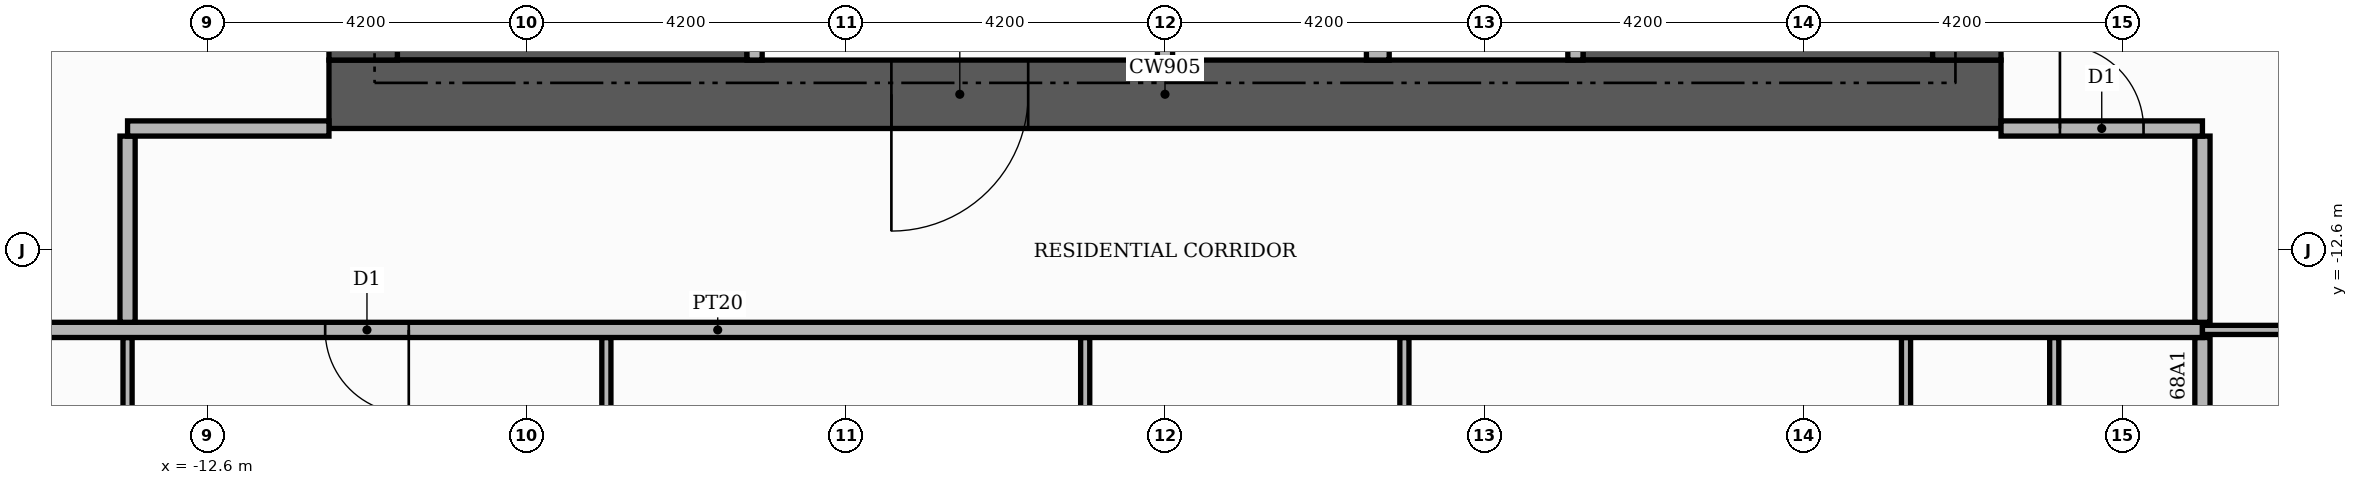
"""IFC4 building model, lengths in metres.
Left out: names, types, materials, properties, quantities, classifications, styles, units other than length and angle.
Written with IfcOpenShell. Run it as: python <this file> out.ifc"""

import sys

from ifc_helpers import new_model, si_unit, direction, frame, frame_2d, origin, place, context, subcontext, project, spatial, rectangle, extrude, element, fill, save


model = new_model("IFC4")
c1 = context("Model", 3, precision=1e-05, world=origin(), true_north=direction((0.0, 1.0)))
c2 = subcontext(c1, "Body", "Model", "MODEL_VIEW")
j1 = project(units=[si_unit("LENGTHUNIT", "METRE"), si_unit("PLANEANGLEUNIT", "RADIAN")], contexts=[c1])
p1 = place(None, origin())
s1 = spatial("IfcSite", under=j1, at=p1, CompositionType="ELEMENT")
p2 = place(p1, origin())
s2 = spatial("IfcBuilding", under=s1, at=p2, CompositionType="ELEMENT")
p3 = place(p2, frame((0.0, 0.0, 283.5)))
s3 = spatial("IfcBuildingStorey", under=s2, at=p3, CompositionType="ELEMENT", Elevation=283.5)
for number, where, z_axis, x_axis in (
    (1, (-10.1, -9.15, 0.0), (0.0, 0.0, 1.0), (1.0, 0.0, 0.0)),
    (2, (5.5, -9.15, 0.0), (0.0, 0.0, 1.0), (1.0, 0.0, 0.0)),
):
    element("IfcWall", number, at=place(p3, frame(where, z_axis=z_axis, x_axis=x_axis)), inside=s3, PredefinedType="SHEAR", context=c2, shape_type="SweptSolid", body=[
        extrude(rectangle(XDim=4.6, YDim=1.9, at=frame_2d((2.3, 0.0))), origin(), (0.0, 0.0, 1.0), 3.4),
    ])
p4 = place(p3, frame((-11.0, -10.55, 0.0), z_axis=(0.0, 0.0, 1.0), x_axis=(1.0, 0.0, 0.0)))
e3 = element("IfcWall", 3, at=p4, inside=s3, PredefinedType="SHEAR", context=c2, shape_type="SweptSolid", body=[
    extrude(rectangle(XDim=22.0, YDim=0.9, at=frame_2d((11.0, 0.0))), origin(), (0.0, 0.0, 1.0), 3.4),
])
p5 = place(p4, frame((7.4, 0.0, 0.0)))
e4 = element("IfcOpeningElement", 4, at=p5, cuts=e3, PredefinedType="OPENING", context=c2, shape_type="SweptSolid", body=[
    extrude(rectangle(XDim=1.8, YDim=2.2, at=frame_2d((0.9, 1.1))), frame((0.0, 0.46, 0.0), z_axis=(0.0, -1.0, 0.0), x_axis=(1.0, 0.0, 0.0)), (0.0, 0.0, 1.0), 0.92),
])
for number, where, z_axis, x_axis in (
    (5, (-10.55, -10.1, 0.0), (0.0, 0.0, 1.0), (0.0, 1.0, 0.0)),
    (6, (10.55, -10.1, 0.0), (0.0, 0.0, 1.0), (0.0, 1.0, 0.0)),
):
    element("IfcWall", number, at=place(p3, frame(where, z_axis=z_axis, x_axis=x_axis)), inside=s3, PredefinedType="SHEAR", context=c2, shape_type="SweptSolid", body=[
        extrude(rectangle(XDim=20.2, YDim=0.9, at=frame_2d((10.1, 0.0))), origin(), (0.0, 0.0, 1.0), 3.4),
    ])
p6 = place(p3, frame((-5.4, -10.1, 0.0), z_axis=(0.0, 0.0, 1.0), x_axis=(0.0, 1.0, 0.0)))
e7 = element("IfcWall", 7, at=p6, inside=s3, PredefinedType="PARTITIONING", context=c2, shape_type="SweptSolid", body=[
    extrude(rectangle(XDim=4.6, YDim=0.2, at=frame_2d((2.3, 0.0))), origin(), (0.0, 0.0, 1.0), 3.4),
])
p7 = place(p6, frame((2.9, 0.0, 0.0)))
e8 = element("IfcOpeningElement", 8, at=p7, cuts=e7, PredefinedType="OPENING", context=c2, shape_type="SweptSolid", body=[
    extrude(rectangle(XDim=1.0, YDim=2.1, at=frame_2d((0.5, 1.05))), frame((0.0, 0.11, 0.0), z_axis=(0.0, -1.0, 0.0), x_axis=(1.0, 0.0, 0.0)), (0.0, 0.0, 1.0), 0.22),
])
p8 = place(p3, frame((0.0, -10.1, 0.0), z_axis=(0.0, 0.0, 1.0), x_axis=(0.0, 1.0, 0.0)))
e9 = element("IfcWall", 9, at=p8, inside=s3, PredefinedType="PARTITIONING", context=c2, shape_type="SweptSolid", body=[
    extrude(rectangle(XDim=2.2, YDim=0.2, at=frame_2d((1.1, 0.0))), origin(), (0.0, 0.0, 1.0), 3.4),
])
p9 = place(p3, frame((2.8, -10.1, 0.0), z_axis=(0.0, 0.0, 1.0), x_axis=(0.0, 1.0, 0.0)))
e10 = element("IfcWall", 10, at=p9, inside=s3, PredefinedType="PARTITIONING", context=c2, shape_type="SweptSolid", body=[
    extrude(rectangle(XDim=2.2, YDim=0.3, at=frame_2d((1.1, 0.0))), origin(), (0.0, 0.0, 1.0), 3.4),
])
p10 = place(p3, frame((5.4, -10.1, 0.0), z_axis=(0.0, 0.0, 1.0), x_axis=(0.0, 1.0, 0.0)))
e11 = element("IfcWall", 11, at=p10, inside=s3, PredefinedType="PARTITIONING", context=c2, shape_type="SweptSolid", body=[
    extrude(rectangle(XDim=4.6, YDim=0.2, at=frame_2d((2.3, 0.0))), origin(), (0.0, 0.0, 1.0), 3.4),
])
p11 = place(p10, frame((2.9, 0.0, 0.0)))
e12 = element("IfcOpeningElement", 12, at=p11, cuts=e11, PredefinedType="OPENING", context=c2, shape_type="SweptSolid", body=[
    extrude(rectangle(XDim=1.0, YDim=2.1, at=frame_2d((0.5, 1.05))), frame((0.0, 0.11, 0.0), z_axis=(0.0, -1.0, 0.0), x_axis=(1.0, 0.0, 0.0)), (0.0, 0.0, 1.0), 0.22),
])
p12 = place(p3, frame((13.65, -20.42, 0.0), z_axis=(0.0, 0.0, 1.0), x_axis=(0.0, 1.0, 0.0)))
e13 = element("IfcWall", 13, at=p12, inside=s3, PredefinedType="PARTITIONING", context=c2, shape_type="SweptSolid", body=[
    extrude(rectangle(XDim=6.67, YDim=0.2, at=frame_2d((3.335, 0.0))), origin(), (0.0, 0.0, 1.0), 3.4),
])
p13 = place(p3, frame((-13.65, -20.119, 0.0), z_axis=(0.0, 0.0, 1.0), x_axis=(0.0, 1.0, 0.0)))
e14 = element("IfcWall", 14, at=p13, inside=s3, PredefinedType="PARTITIONING", context=c2, shape_type="SweptSolid", body=[
    extrude(rectangle(XDim=6.369, YDim=0.12, at=frame_2d((3.185, 0.0))), origin(), (0.0, 0.0, 1.0), 3.4),
])
p14 = place(p13, frame((2.784, 0.0, 0.0)))
e15 = element("IfcOpeningElement", 15, at=p14, cuts=e14, PredefinedType="OPENING", context=c2, shape_type="SweptSolid", body=[
    extrude(rectangle(XDim=0.9, YDim=2.1, at=frame_2d((0.45, 1.05))), frame((0.0, 0.07, 0.0), z_axis=(0.0, -1.0, 0.0), x_axis=(1.0, 0.0, 0.0)), (0.0, 0.0, 1.0), 0.14),
])
for number, where, z_axis, x_axis in (
    (16, (-7.35, -18.56, 0.0), (0.0, 0.0, 1.0), (0.0, 1.0, 0.0)),
    (17, (-1.05, -18.56, 0.0), (0.0, 0.0, 1.0), (0.0, 1.0, 0.0)),
    (18, (3.15, -18.56, 0.0), (0.0, 0.0, 1.0), (0.0, 1.0, 0.0)),
    (19, (9.75, -18.56, 0.0), (0.0, 0.0, 1.0), (0.0, 1.0, 0.0)),
    (20, (11.7, -18.56, 0.0), (0.0, 0.0, 1.0), (0.0, 1.0, 0.0)),
):
    element("IfcWall", number, at=place(p3, frame(where, z_axis=z_axis, x_axis=x_axis)), inside=s3, PredefinedType="PARTITIONING", context=c2, shape_type="SweptSolid", body=[
        extrude(rectangle(XDim=4.81, YDim=0.12, at=frame_2d((2.405, 0.0))), origin(), (0.0, 0.0, 1.0), 3.4),
    ])
p15 = place(p3, frame((-25.42, -13.65, 0.0), z_axis=(0.0, 0.0, 1.0), x_axis=(1.0, 0.0, 0.0)))
e21 = element("IfcWall", 21, at=p15, inside=s3, PredefinedType="PARTITIONING", context=c2, shape_type="SweptSolid", body=[
    extrude(rectangle(XDim=39.07, YDim=0.2, at=frame_2d((19.535, 0.0))), origin(), (0.0, 0.0, 1.0), 3.4),
])
p16 = place(p15, frame((14.37, 0.0, 0.0)))
e22 = element("IfcOpeningElement", 22, at=p16, cuts=e21, PredefinedType="OPENING", context=c2, shape_type="SweptSolid", body=[
    extrude(rectangle(XDim=1.1, YDim=2.4, at=frame_2d((0.55, 1.2))), frame((0.0, 0.11, 0.0), z_axis=(0.0, -1.0, 0.0), x_axis=(1.0, 0.0, 0.0)), (0.0, 0.0, 1.0), 0.22),
])
p17 = place(p3, frame((13.65, -13.65, 0.0), z_axis=(0.0, 0.0, 1.0), x_axis=(1.0, 0.0, 0.0)))
e23 = element("IfcWall", 23, at=p17, inside=s3, PredefinedType="PARTITIONING", context=c2, shape_type="SweptSolid", body=[
    extrude(rectangle(XDim=6.77, YDim=0.12, at=frame_2d((3.385, 0.0))), origin(), (0.0, 0.0, 1.0), 3.4),
])
p18 = place(p17, frame((2.885, 0.0, 0.0)))
e24 = element("IfcOpeningElement", 24, at=p18, cuts=e23, PredefinedType="OPENING", context=c2, shape_type="SweptSolid", body=[
    extrude(rectangle(XDim=1.0, YDim=2.1, at=frame_2d((0.5, 1.05))), frame((0.0, 0.07, 0.0), z_axis=(0.0, -1.0, 0.0), x_axis=(1.0, 0.0, 0.0)), (0.0, 0.0, 1.0), 0.14),
])
for number, where, z_axis, x_axis in (
    (25, (-13.65, -13.55, 0.0), (0.0, 0.0, 1.0), (0.0, 1.0, 0.0)),
    (26, (13.65, -13.55, 0.0), (0.0, 0.0, 1.0), (0.0, 1.0, 0.0)),
):
    element("IfcWall", number, at=place(p3, frame(where, z_axis=z_axis, x_axis=x_axis)), inside=s3, PredefinedType="PARTITIONING", context=c2, shape_type="SweptSolid", body=[
        extrude(rectangle(XDim=2.45, YDim=0.2, at=frame_2d((1.225, 0.0))), origin(), (0.0, 0.0, 1.0), 3.4),
    ])
p19 = place(p3, frame((-13.65, -11.0, 0.0), z_axis=(0.0, 0.0, 1.0), x_axis=(1.0, 0.0, 0.0)))
e27 = element("IfcWall", 27, at=p19, inside=s3, PredefinedType="PARTITIONING", context=c2, shape_type="SweptSolid", body=[
    extrude(rectangle(XDim=2.65, YDim=0.2, at=frame_2d((1.325, 0.0))), origin(), (0.0, 0.0, 1.0), 3.4),
])
p20 = place(p3, frame((11.0, -11.0, 0.0), z_axis=(0.0, 0.0, 1.0), x_axis=(1.0, 0.0, 0.0)))
e28 = element("IfcWall", 28, at=p20, inside=s3, PredefinedType="PARTITIONING", context=c2, shape_type="SweptSolid", body=[
    extrude(rectangle(XDim=2.65, YDim=0.2, at=frame_2d((1.325, 0.0))), origin(), (0.0, 0.0, 1.0), 3.4),
])
p21 = place(p20, frame((0.775, 0.0, 0.0)))
e29 = element("IfcOpeningElement", 29, at=p21, cuts=e28, PredefinedType="OPENING", context=c2, shape_type="SweptSolid", body=[
    extrude(rectangle(XDim=1.1, YDim=2.4, at=frame_2d((0.55, 1.2))), frame((0.0, 0.11, 0.0), z_axis=(0.0, -1.0, 0.0), x_axis=(1.0, 0.0, 0.0)), (0.0, 0.0, 1.0), 0.22),
])
p22 = place(p5, frame((1.8, 0.0, 0.0), z_axis=(0.0, 0.0, 1.0), x_axis=(-1.0, 0.0, 0.0)))
e30 = element("IfcDoor", 30, at=p22, inside=s3, OperationType="DOUBLE_DOOR_SINGLE_SWING", PredefinedType="DOOR", context=c2, shape_type="SweptSolid", body=[
    extrude(rectangle(XDim=1.8, YDim=2.2, at=frame_2d((0.9, 1.1))), frame((0.0, 0.025, 0.0), z_axis=(0.0, -1.0, 0.0), x_axis=(1.0, 0.0, 0.0)), (0.0, 0.0, 1.0), 0.05),
])
fill(e4, e30)
p23 = place(p16, frame((1.1, 0.0, 0.0), z_axis=(0.0, 0.0, 1.0), x_axis=(-1.0, 0.0, 0.0)))
e31 = element("IfcDoor", 31, at=p23, inside=s3, OperationType="SINGLE_SWING_RIGHT", PredefinedType="DOOR", context=c2, shape_type="SweptSolid", body=[
    extrude(rectangle(XDim=1.1, YDim=2.4, at=frame_2d((0.55, 1.2))), frame((0.0, 0.025, 0.0), z_axis=(0.0, -1.0, 0.0), x_axis=(1.0, 0.0, 0.0)), (0.0, 0.0, 1.0), 0.05),
])
fill(e22, e31)
p24 = place(p21, origin())
e32 = element("IfcDoor", 32, at=p24, inside=s3, OperationType="SINGLE_SWING_LEFT", PredefinedType="DOOR", context=c2, shape_type="SweptSolid", body=[
    extrude(rectangle(XDim=1.1, YDim=2.4, at=frame_2d((0.55, 1.2))), frame((0.0, 0.025, 0.0), z_axis=(0.0, -1.0, 0.0), x_axis=(1.0, 0.0, 0.0)), (0.0, 0.0, 1.0), 0.05),
])
fill(e29, e32)
save(model, sys.argv[1])
